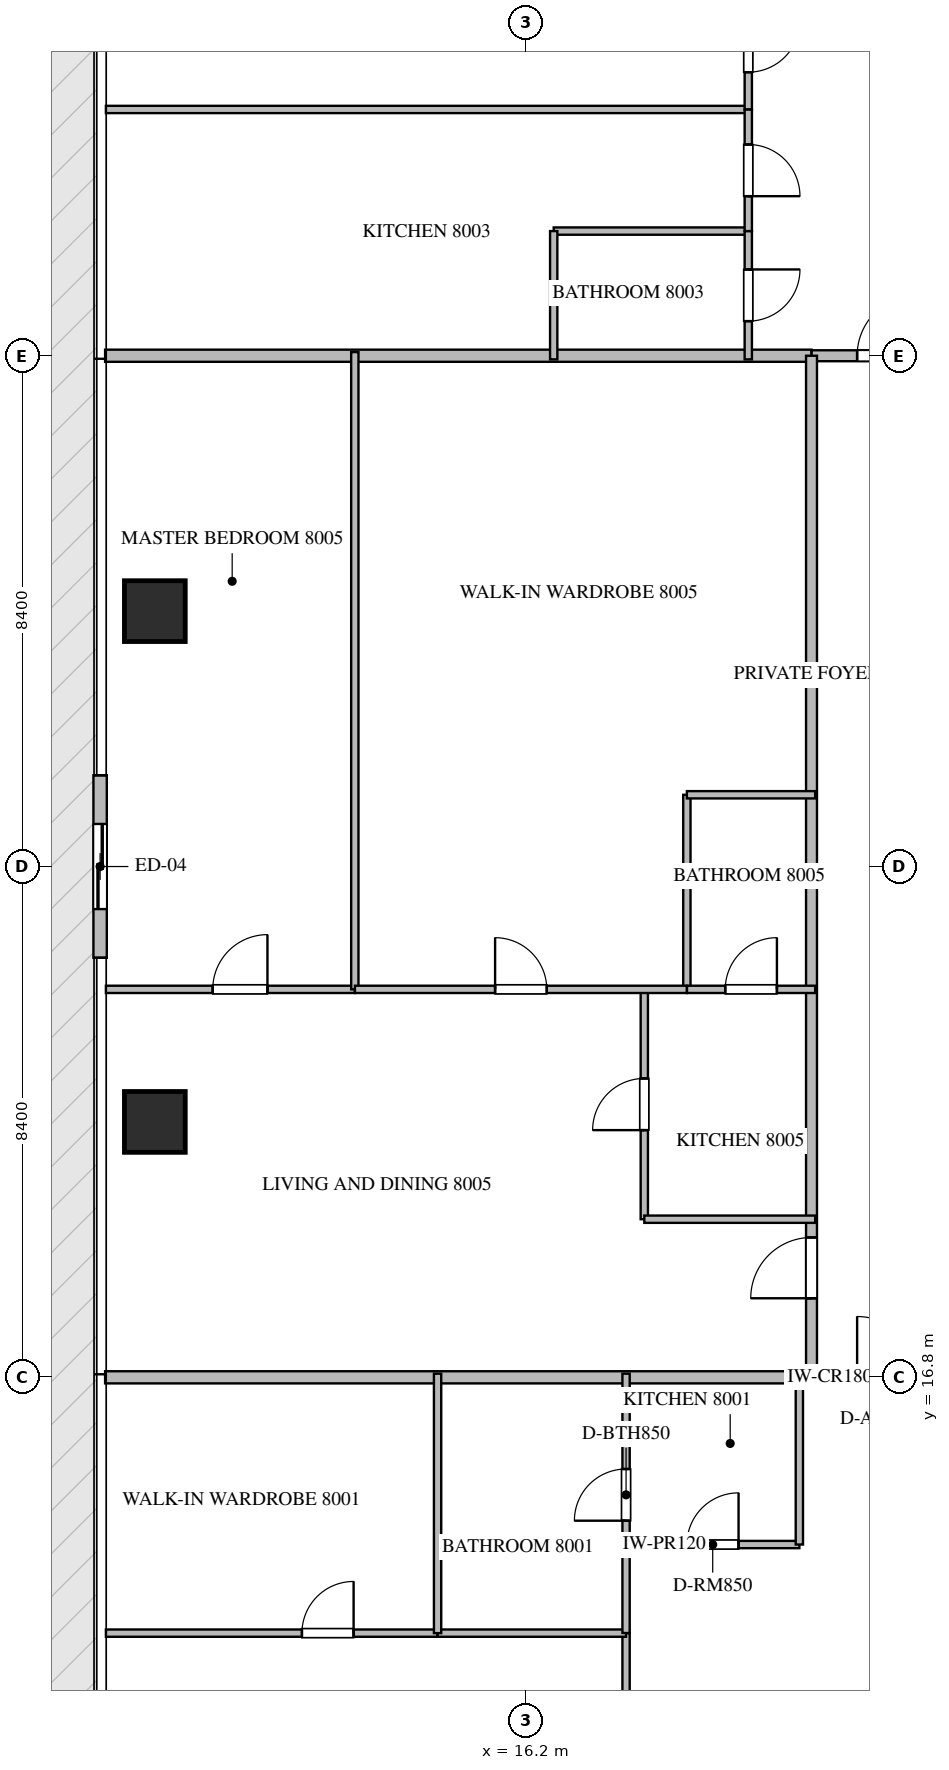
"""IFC4 building model, lengths in metres.
Left out: names, types, materials, properties, quantities, classifications, styles, units other than length and angle.
Written with IfcOpenShell. Run it as: python <this file> out.ifc"""

import sys

from ifc_helpers import new_model, si_unit, direction, frame, frame_2d, origin, origin_2d, place, context, subcontext, project, spatial, rectangle, extrude, source, transform, mapped, element, fill, save


model = new_model("IFC4")
c1 = context("Model", 3, precision=1e-05, world=origin(), true_north=direction((0.0, 1.0)))
c2 = subcontext(c1, "Body", "Model", "MODEL_VIEW")
j1 = project(units=[si_unit("LENGTHUNIT", "METRE"), si_unit("PLANEANGLEUNIT", "RADIAN")], contexts=[c1])
p1 = place(None, origin())
s1 = spatial("IfcSite", under=j1, at=p1, CompositionType="ELEMENT")
p2 = place(p1, origin())
s2 = spatial("IfcBuilding", under=s1, at=p2, CompositionType="ELEMENT")
p3 = place(p2, frame((0.0, 0.0, 321.8)))
s3 = spatial("IfcBuildingStorey", under=s2, at=p3, CompositionType="ELEMENT", Elevation=321.8)
m1 = source(origin(), c2, "Body", "SweptSolid", [
    extrude(rectangle(XDim=1.0, YDim=1.0, at=origin_2d()), origin(), (0.0, 0.0, 1.0), 4.05),
])
for number, where, z_axis, x_axis in (
    (1, (10.1, 21.0, -0.26), (0.0, 0.0, 1.0), (1.0, 0.0, 0.0)),
    (2, (10.1, 29.4, -0.26), (0.0, 0.0, 1.0), (1.0, 0.0, 0.0)),
):
    element("IfcColumn", number, at=place(p3, frame(where, z_axis=z_axis, x_axis=x_axis)), inside=s3, PredefinedType="COLUMN", context=c2, shape_type="MappedRepresentation", body=[
        mapped(m1, transform((0.0, 0.0, 0.0), scale=1.0)),
    ])
p4 = place(p3, frame((9.2, 26.7, 0.0), z_axis=(0.0, 0.0, 1.0), x_axis=(0.0, -1.0, 0.0)))
e3 = element("IfcWall", 3, at=p4, inside=s3, PredefinedType="ELEMENTEDWALL", context=c2, shape_type="SweptSolid", body=[
    extrude(rectangle(XDim=3.0, YDim=0.22, at=frame_2d((1.5, 0.0))), origin(), (0.0, 0.0, 1.0), 3.775),
])
p5 = place(p4, frame((0.8, 0.0, 0.0)))
e4 = element("IfcOpeningElement", 4, at=p5, cuts=e3, PredefinedType="OPENING", context=c2, shape_type="SweptSolid", body=[
    extrude(rectangle(XDim=1.4, YDim=2.25, at=frame_2d((0.7, 1.125))), frame((0.0, 0.12, 0.0), z_axis=(0.0, -1.0, 0.0), x_axis=(1.0, 0.0, 0.0)), (0.0, 0.0, 1.0), 0.24),
])
for number, where, z_axis, x_axis in (
    (5, (9.282, 16.8, 0.0), (0.0, 0.0, 1.0), (1.0, 0.0, 0.0)),
    (6, (9.282, 33.6, 0.0), (0.0, 0.0, 1.0), (1.0, 0.0, 0.0)),
):
    element("IfcWall", number, at=place(p3, frame(where, z_axis=z_axis, x_axis=x_axis)), inside=s3, PredefinedType="PARTITIONING", context=c2, shape_type="SweptSolid", body=[
        extrude(rectangle(XDim=11.618, YDim=0.2, at=frame_2d((5.809, 0.0))), origin(), (0.0, 0.0, 1.0), 3.79),
    ])
p6 = place(p3, frame((20.902, 16.8, 0.0), z_axis=(0.0, 0.0, 1.0), x_axis=(1.0, 0.0, 0.0)))
e7 = element("IfcWall", 7, at=p6, inside=s3, PredefinedType="PARTITIONING", context=c2, shape_type="SweptSolid", body=[
    extrude(rectangle(XDim=2.496, YDim=0.18, at=frame_2d((1.248, 0.0))), origin(), (0.0, 0.0, 1.0), 3.79),
])
p7 = place(p6, frame((0.748, 0.0, 0.0)))
e8 = element("IfcOpeningElement", 8, at=p7, cuts=e7, PredefinedType="OPENING", context=c2, shape_type="SweptSolid", body=[
    extrude(rectangle(XDim=1.0, YDim=2.15, at=frame_2d((0.5, 1.075))), frame((0.0, 0.1, 0.0), z_axis=(0.0, -1.0, 0.0), x_axis=(1.0, 0.0, 0.0)), (0.0, 0.0, 1.0), 0.2),
])
p8 = place(p3, frame((20.902, 33.6, 0.0), z_axis=(0.0, 0.0, 1.0), x_axis=(1.0, 0.0, 0.0)))
e9 = element("IfcWall", 9, at=p8, inside=s3, PredefinedType="PARTITIONING", context=c2, shape_type="SweptSolid", body=[
    extrude(rectangle(XDim=2.496, YDim=0.18, at=frame_2d((1.248, 0.0))), origin(), (0.0, 0.0, 1.0), 3.79),
])
p9 = place(p8, frame((0.748, 0.0, 0.0)))
e10 = element("IfcOpeningElement", 10, at=p9, cuts=e9, PredefinedType="OPENING", context=c2, shape_type="SweptSolid", body=[
    extrude(rectangle(XDim=1.0, YDim=2.15, at=frame_2d((0.5, 1.075))), frame((0.0, 0.1, 0.0), z_axis=(0.0, -1.0, 0.0), x_axis=(1.0, 0.0, 0.0)), (0.0, 0.0, 1.0), 0.2),
])
p10 = place(p3, frame((20.9, 16.8, 0.0), z_axis=(0.0, 0.0, 1.0), x_axis=(0.0, 1.0, 0.0)))
e11 = element("IfcWall", 11, at=p10, inside=s3, PredefinedType="PARTITIONING", context=c2, shape_type="SweptSolid", body=[
    extrude(rectangle(XDim=16.8, YDim=0.18, at=frame_2d((8.4, 0.0))), origin(), (0.0, 0.0, 1.0), 3.79),
])
p11 = place(p10, frame((1.3, 0.0, 0.0)))
e12 = element("IfcOpeningElement", 12, at=p11, cuts=e11, PredefinedType="OPENING", context=c2, shape_type="SweptSolid", body=[
    extrude(rectangle(XDim=1.0, YDim=2.15, at=frame_2d((0.5, 1.075))), frame((0.0, 0.1, 0.0), z_axis=(0.0, -1.0, 0.0), x_axis=(1.0, 0.0, 0.0)), (0.0, 0.0, 1.0), 0.2),
])
p12 = place(p3, frame((17.85, 14.05, 0.0), z_axis=(0.0, 0.0, 1.0), x_axis=(1.0, 0.0, 0.0)))
e13 = element("IfcWall", 13, at=p12, inside=s3, PredefinedType="PARTITIONING", context=c2, shape_type="SweptSolid", body=[
    extrude(rectangle(XDim=2.85, YDim=0.12, at=frame_2d((1.425, 0.0))), origin(), (0.0, 0.0, 1.0), 3.79),
])
p13 = place(p12, frame((1.0, 0.0, 0.0)))
e14 = element("IfcOpeningElement", 14, at=p13, cuts=e13, PredefinedType="OPENING", context=c2, shape_type="SweptSolid", body=[
    extrude(rectangle(XDim=0.85, YDim=2.1, at=frame_2d((0.425, 1.05))), frame((0.0, 0.07, 0.0), z_axis=(0.0, -1.0, 0.0), x_axis=(1.0, 0.0, 0.0)), (0.0, 0.0, 1.0), 0.14),
])
p14 = place(p3, frame((20.7, 14.05, 0.0), z_axis=(0.0, 0.0, 1.0), x_axis=(0.0, 1.0, 0.0)))
e15 = element("IfcWall", 15, at=p14, inside=s3, PredefinedType="PARTITIONING", context=c2, shape_type="SweptSolid", body=[
    extrude(rectangle(XDim=2.81, YDim=0.12, at=frame_2d((1.405, 0.0))), origin(), (0.0, 0.0, 1.0), 3.79),
])
p15 = place(p3, frame((17.85, 2.495, 0.0), z_axis=(0.0, 0.0, 1.0), x_axis=(0.0, 1.0, 0.0)))
e16 = element("IfcWall", 16, at=p15, inside=s3, PredefinedType="PARTITIONING", context=c2, shape_type="SweptSolid", body=[
    extrude(rectangle(XDim=10.098, YDim=0.12, at=frame_2d((5.049, 0.0))), origin(), (0.0, 0.0, 1.0), 3.292),
])
p16 = place(p15, frame((5.059, 0.0, 0.0)))
e17 = element("IfcOpeningElement", 17, at=p16, cuts=e16, PredefinedType="OPENING", context=c2, shape_type="SweptSolid", body=[
    extrude(rectangle(XDim=0.9, YDim=2.1, at=frame_2d((0.45, 1.05))), frame((0.0, 0.07, 0.0), z_axis=(0.0, -1.0, 0.0), x_axis=(1.0, 0.0, 0.0)), (0.0, 0.0, 1.0), 0.14),
])
p17 = place(p3, frame((9.295, 12.593, 0.0), z_axis=(0.0, 0.0, 1.0), x_axis=(1.0, 0.0, 0.0)))
e18 = element("IfcWall", 18, at=p17, inside=s3, PredefinedType="PARTITIONING", context=c2, shape_type="SweptSolid", body=[
    extrude(rectangle(XDim=5.455, YDim=0.12, at=frame_2d((2.728, 0.0))), origin(), (0.0, 0.0, 1.0), 3.79),
])
p18 = place(p17, frame((3.224, 0.0, 0.0)))
e19 = element("IfcOpeningElement", 19, at=p18, cuts=e18, PredefinedType="OPENING", context=c2, shape_type="SweptSolid", body=[
    extrude(rectangle(XDim=0.85, YDim=2.1, at=frame_2d((0.425, 1.05))), frame((0.0, 0.07, 0.0), z_axis=(0.0, -1.0, 0.0), x_axis=(1.0, 0.0, 0.0)), (0.0, 0.0, 1.0), 0.14),
])
p19 = place(p3, frame((14.752, 12.593, 0.0), z_axis=(0.0, 0.0, 1.0), x_axis=(1.0, 0.0, 0.0)))
e20 = element("IfcWall", 20, at=p19, inside=s3, PredefinedType="PARTITIONING", context=c2, shape_type="SweptSolid", body=[
    extrude(rectangle(XDim=3.098, YDim=0.12, at=frame_2d((1.549, 0.0))), origin(), (0.0, 0.0, 1.0), 3.79),
])
p20 = place(p3, frame((14.75, 12.593, 0.0), z_axis=(0.0, 0.0, 1.0), x_axis=(0.0, 1.0, 0.0)))
e21 = element("IfcWall", 21, at=p20, inside=s3, PredefinedType="PARTITIONING", context=c2, shape_type="SweptSolid", body=[
    extrude(rectangle(XDim=4.267, YDim=0.12, at=frame_2d((2.134, 0.0))), origin(), (0.0, 0.0, 1.0), 3.79),
])
p21 = place(p3, frame((17.85, 12.595, 0.0), z_axis=(0.0, 0.0, 1.0), x_axis=(0.0, 1.0, 0.0)))
e22 = element("IfcWall", 22, at=p21, inside=s3, PredefinedType="PARTITIONING", context=c2, shape_type="SweptSolid", body=[
    extrude(rectangle(XDim=4.265, YDim=0.12, at=frame_2d((2.133, 0.0))), origin(), (0.0, 0.0, 1.0), 3.372),
])
p22 = place(p21, frame((1.847, 0.0, 0.0)))
e23 = element("IfcOpeningElement", 23, at=p22, cuts=e22, PredefinedType="OPENING", context=c2, shape_type="SweptSolid", body=[
    extrude(rectangle(XDim=0.85, YDim=2.1, at=frame_2d((0.425, 1.05))), frame((0.0, 0.07, 0.0), z_axis=(0.0, -1.0, 0.0), x_axis=(1.0, 0.0, 0.0)), (0.0, 0.0, 1.0), 0.14),
])
p23 = place(p3, frame((9.295, 37.65, 0.0), z_axis=(0.0, 0.0, 1.0), x_axis=(1.0, 0.0, 0.0)))
e24 = element("IfcWall", 24, at=p23, inside=s3, PredefinedType="PARTITIONING", context=c2, shape_type="SweptSolid", body=[
    extrude(rectangle(XDim=10.565, YDim=0.12, at=frame_2d((5.283, 0.0))), origin(), (0.0, 0.0, 1.0), 3.79),
])
p24 = place(p3, frame((16.66, 35.65, 0.0), z_axis=(0.0, 0.0, 1.0), x_axis=(1.0, 0.0, 0.0)))
e25 = element("IfcWall", 25, at=p24, inside=s3, PredefinedType="PARTITIONING", context=c2, shape_type="SweptSolid", body=[
    extrude(rectangle(XDim=3.2, YDim=0.12, at=frame_2d((1.6, 0.0))), origin(), (0.0, 0.0, 1.0), 3.79),
])
p25 = place(p3, frame((16.66, 35.65, 0.0), z_axis=(0.0, 0.0, 1.0), x_axis=(0.0, -1.0, 0.0)))
e26 = element("IfcWall", 26, at=p25, inside=s3, PredefinedType="PARTITIONING", context=c2, shape_type="SweptSolid", body=[
    extrude(rectangle(XDim=2.11, YDim=0.12, at=frame_2d((1.055, 0.0))), origin(), (0.0, 0.0, 1.0), 3.79),
])
p26 = place(p3, frame((19.86, 39.726, 0.0), z_axis=(0.0, 0.0, 1.0), x_axis=(0.0, -1.0, 0.0)))
e27 = element("IfcWall", 27, at=p26, inside=s3, PredefinedType="PARTITIONING", context=c2, shape_type="SweptSolid", body=[
    extrude(rectangle(XDim=2.076, YDim=0.12, at=frame_2d((1.038, 0.0))), origin(), (0.0, 0.0, 1.0), 3.79),
])
p27 = place(p26, frame((0.613, 0.0, 0.0)))
e28 = element("IfcOpeningElement", 28, at=p27, cuts=e27, PredefinedType="OPENING", context=c2, shape_type="SweptSolid", body=[
    extrude(rectangle(XDim=0.85, YDim=2.1, at=frame_2d((0.425, 1.05))), frame((0.0, 0.07, 0.0), z_axis=(0.0, -1.0, 0.0), x_axis=(1.0, 0.0, 0.0)), (0.0, 0.0, 1.0), 0.14),
])
p28 = place(p3, frame((19.86, 37.648, 0.0), z_axis=(0.0, 0.0, 1.0), x_axis=(0.0, -1.0, 0.0)))
e29 = element("IfcWall", 29, at=p28, inside=s3, PredefinedType="PARTITIONING", context=c2, shape_type="SweptSolid", body=[
    extrude(rectangle(XDim=1.998, YDim=0.12, at=frame_2d((0.999, 0.0))), origin(), (0.0, 0.0, 1.0), 3.79),
])
p29 = place(p28, frame((0.574, 0.0, 0.0)))
e30 = element("IfcOpeningElement", 30, at=p29, cuts=e29, PredefinedType="OPENING", context=c2, shape_type="SweptSolid", body=[
    extrude(rectangle(XDim=0.85, YDim=2.1, at=frame_2d((0.425, 1.05))), frame((0.0, 0.07, 0.0), z_axis=(0.0, -1.0, 0.0), x_axis=(1.0, 0.0, 0.0)), (0.0, 0.0, 1.0), 0.14),
])
p30 = place(p3, frame((19.86, 35.648, 0.0), z_axis=(0.0, 0.0, 1.0), x_axis=(0.0, -1.0, 0.0)))
e31 = element("IfcWall", 31, at=p30, inside=s3, PredefinedType="PARTITIONING", context=c2, shape_type="SweptSolid", body=[
    extrude(rectangle(XDim=2.108, YDim=0.12, at=frame_2d((1.054, 0.0))), origin(), (0.0, 0.0, 1.0), 3.79),
])
p31 = place(p30, frame((0.629, 0.0, 0.0)))
e32 = element("IfcOpeningElement", 32, at=p31, cuts=e31, PredefinedType="OPENING", context=c2, shape_type="SweptSolid", body=[
    extrude(rectangle(XDim=0.85, YDim=2.1, at=frame_2d((0.425, 1.05))), frame((0.0, 0.07, 0.0), z_axis=(0.0, -1.0, 0.0), x_axis=(1.0, 0.0, 0.0)), (0.0, 0.0, 1.0), 0.14),
])
p32 = place(p3, frame((18.15, 19.4, 0.0), z_axis=(0.0, 0.0, 1.0), x_axis=(0.0, 1.0, 0.0)))
e33 = element("IfcWall", 33, at=p32, inside=s3, PredefinedType="PARTITIONING", context=c2, shape_type="SweptSolid", body=[
    extrude(rectangle(XDim=3.78, YDim=0.12, at=frame_2d((1.89, 0.0))), origin(), (0.0, 0.0, 1.0), 3.79),
])
p33 = place(p32, frame((1.465, 0.0, 0.0)))
e34 = element("IfcOpeningElement", 34, at=p33, cuts=e33, PredefinedType="OPENING", context=c2, shape_type="SweptSolid", body=[
    extrude(rectangle(XDim=0.85, YDim=2.1, at=frame_2d((0.425, 1.05))), frame((0.0, 0.07, 0.0), z_axis=(0.0, -1.0, 0.0), x_axis=(1.0, 0.0, 0.0)), (0.0, 0.0, 1.0), 0.14),
])
p34 = place(p3, frame((18.15, 19.4, 0.0), z_axis=(0.0, 0.0, 1.0), x_axis=(1.0, 0.0, 0.0)))
e35 = element("IfcWall", 35, at=p34, inside=s3, PredefinedType="PARTITIONING", context=c2, shape_type="SweptSolid", body=[
    extrude(rectangle(XDim=2.81, YDim=0.12, at=frame_2d((1.405, 0.0))), origin(), (0.0, 0.0, 1.0), 3.79),
])
p35 = place(p3, frame((9.295, 23.18, 0.0), z_axis=(0.0, 0.0, 1.0), x_axis=(1.0, 0.0, 0.0)))
e36 = element("IfcWall", 36, at=p35, inside=s3, PredefinedType="PARTITIONING", context=c2, shape_type="SweptSolid", body=[
    extrude(rectangle(XDim=4.094, YDim=0.12, at=frame_2d((2.047, 0.0))), origin(), (0.0, 0.0, 1.0), 3.79),
])
p36 = place(p35, frame((1.757, 0.0, 0.0)))
e37 = element("IfcOpeningElement", 37, at=p36, cuts=e36, PredefinedType="OPENING", context=c2, shape_type="SweptSolid", body=[
    extrude(rectangle(XDim=0.9, YDim=2.1, at=frame_2d((0.45, 1.05))), frame((0.0, 0.07, 0.0), z_axis=(0.0, -1.0, 0.0), x_axis=(1.0, 0.0, 0.0)), (0.0, 0.0, 1.0), 0.14),
])
p37 = place(p3, frame((13.389, 23.18, 0.0), z_axis=(0.0, 0.0, 1.0), x_axis=(0.0, 1.0, 0.0)))
e38 = element("IfcWall", 38, at=p37, inside=s3, PredefinedType="PARTITIONING", context=c2, shape_type="SweptSolid", body=[
    extrude(rectangle(XDim=10.48, YDim=0.12, at=frame_2d((5.24, 0.0))), origin(), (0.0, 0.0, 1.0), 3.79),
])
p38 = place(p3, frame((18.85, 23.18, 0.0), z_axis=(0.0, 0.0, 1.0), x_axis=(0.0, 1.0, 0.0)))
e39 = element("IfcWall", 39, at=p38, inside=s3, PredefinedType="PARTITIONING", context=c2, shape_type="SweptSolid", body=[
    extrude(rectangle(XDim=3.2, YDim=0.12, at=frame_2d((1.6, 0.0))), origin(), (0.0, 0.0, 1.0), 3.79),
])
p39 = place(p3, frame((18.85, 26.38, 0.0), z_axis=(0.0, 0.0, 1.0), x_axis=(1.0, 0.0, 0.0)))
e40 = element("IfcWall", 40, at=p39, inside=s3, PredefinedType="PARTITIONING", context=c2, shape_type="SweptSolid", body=[
    extrude(rectangle(XDim=2.11, YDim=0.12, at=frame_2d((1.055, 0.0))), origin(), (0.0, 0.0, 1.0), 3.79),
])
p40 = place(p3, frame((13.391, 23.18, 0.0), z_axis=(0.0, 0.0, 1.0), x_axis=(1.0, 0.0, 0.0)))
e41 = element("IfcWall", 41, at=p40, inside=s3, PredefinedType="PARTITIONING", context=c2, shape_type="SweptSolid", body=[
    extrude(rectangle(XDim=5.459, YDim=0.12, at=frame_2d((2.729, 0.0))), origin(), (0.0, 0.0, 1.0), 3.79),
])
p41 = place(p40, frame((2.305, 0.0, 0.0)))
e42 = element("IfcOpeningElement", 42, at=p41, cuts=e41, PredefinedType="OPENING", context=c2, shape_type="SweptSolid", body=[
    extrude(rectangle(XDim=0.85, YDim=2.1, at=frame_2d((0.425, 1.05))), frame((0.0, 0.07, 0.0), z_axis=(0.0, -1.0, 0.0), x_axis=(1.0, 0.0, 0.0)), (0.0, 0.0, 1.0), 0.14),
])
p42 = place(p3, frame((18.852, 23.18, 0.0), z_axis=(0.0, 0.0, 1.0), x_axis=(1.0, 0.0, 0.0)))
e43 = element("IfcWall", 43, at=p42, inside=s3, PredefinedType="PARTITIONING", context=c2, shape_type="SweptSolid", body=[
    extrude(rectangle(XDim=2.108, YDim=0.12, at=frame_2d((1.054, 0.0))), origin(), (0.0, 0.0, 1.0), 3.79),
])
p43 = place(p42, frame((0.629, 0.0, 0.0)))
e44 = element("IfcOpeningElement", 44, at=p43, cuts=e43, PredefinedType="OPENING", context=c2, shape_type="SweptSolid", body=[
    extrude(rectangle(XDim=0.85, YDim=2.1, at=frame_2d((0.425, 1.05))), frame((0.0, 0.07, 0.0), z_axis=(0.0, -1.0, 0.0), x_axis=(1.0, 0.0, 0.0)), (0.0, 0.0, 1.0), 0.14),
])
m2 = source(origin(), c2, "Body", "SweptSolid", [
    extrude(rectangle(XDim=1.4, YDim=2.25, at=frame_2d((0.7, 1.125))), frame((0.0, 0.025, 0.0), z_axis=(0.0, -1.0, 0.0), x_axis=(1.0, 0.0, 0.0)), (0.0, 0.0, 1.0), 0.05),
])
p44 = place(p5, origin())
e45 = element("IfcDoor", 45, at=p44, inside=s3, OperationType="SLIDING_TO_LEFT", PredefinedType="DOOR", context=c2, shape_type="MappedRepresentation", body=[
    mapped(m2, transform((0.0, 0.0, 0.0), scale=1.0)),
])
fill(e4, e45)
m3 = source(origin(), c2, "Body", "SweptSolid", [
    extrude(rectangle(XDim=1.0, YDim=2.15, at=frame_2d((0.5, 1.075))), frame((0.0, 0.025, 0.0), z_axis=(0.0, -1.0, 0.0), x_axis=(1.0, 0.0, 0.0)), (0.0, 0.0, 1.0), 0.05),
])
p45 = place(p7, origin())
e46 = element("IfcDoor", 46, at=p45, inside=s3, OperationType="SINGLE_SWING_LEFT", PredefinedType="DOOR", context=c2, shape_type="MappedRepresentation", body=[
    mapped(m3, transform((0.0, 0.0, 0.0), scale=1.0)),
])
fill(e8, e46)
p46 = place(p9, origin())
e47 = element("IfcDoor", 47, at=p46, inside=s3, OperationType="SINGLE_SWING_RIGHT", PredefinedType="DOOR", context=c2, shape_type="MappedRepresentation", body=[
    mapped(m3, transform((0.0, 0.0, 0.0), scale=1.0)),
])
fill(e10, e47)
p47 = place(p11, origin())
e48 = element("IfcDoor", 48, at=p47, inside=s3, OperationType="SINGLE_SWING_LEFT", PredefinedType="DOOR", context=c2, shape_type="MappedRepresentation", body=[
    mapped(m3, transform((0.0, 0.0, 0.0), scale=1.0)),
])
fill(e12, e48)
m4 = source(origin(), c2, "Body", "SweptSolid", [
    extrude(rectangle(XDim=0.85, YDim=2.1, at=frame_2d((0.425, 1.05))), frame((0.0, 0.025, 0.0), z_axis=(0.0, -1.0, 0.0), x_axis=(1.0, 0.0, 0.0)), (0.0, 0.0, 1.0), 0.05),
])
p48 = place(p13, origin())
e49 = element("IfcDoor", 49, at=p48, inside=s3, OperationType="SINGLE_SWING_RIGHT", PredefinedType="DOOR", context=c2, shape_type="MappedRepresentation", body=[
    mapped(m4, transform((0.0, 0.0, 0.0), scale=1.0)),
])
fill(e14, e49)
p49 = place(p18, origin())
e50 = element("IfcDoor", 50, at=p49, inside=s3, OperationType="SINGLE_SWING_RIGHT", PredefinedType="DOOR", context=c2, shape_type="MappedRepresentation", body=[
    mapped(m4, transform((0.0, 0.0, 0.0), scale=1.0)),
])
fill(e19, e50)
p50 = place(p22, origin())
e51 = element("IfcDoor", 51, at=p50, inside=s3, OperationType="SINGLE_SWING_LEFT", PredefinedType="DOOR", context=c2, shape_type="MappedRepresentation", body=[
    mapped(m4, transform((0.0, 0.0, 0.0), scale=1.0)),
])
fill(e23, e51)
p51 = place(p27, origin())
e52 = element("IfcDoor", 52, at=p51, inside=s3, OperationType="SINGLE_SWING_LEFT", PredefinedType="DOOR", context=c2, shape_type="MappedRepresentation", body=[
    mapped(m4, transform((0.0, 0.0, 0.0), scale=1.0)),
])
fill(e28, e52)
p52 = place(p29, origin())
e53 = element("IfcDoor", 53, at=p52, inside=s3, OperationType="SINGLE_SWING_RIGHT", PredefinedType="DOOR", context=c2, shape_type="MappedRepresentation", body=[
    mapped(m4, transform((0.0, 0.0, 0.0), scale=1.0)),
])
fill(e30, e53)
p53 = place(p31, origin())
e54 = element("IfcDoor", 54, at=p53, inside=s3, OperationType="SINGLE_SWING_LEFT", PredefinedType="DOOR", context=c2, shape_type="MappedRepresentation", body=[
    mapped(m4, transform((0.0, 0.0, 0.0), scale=1.0)),
])
fill(e32, e54)
p54 = place(p33, origin())
e55 = element("IfcDoor", 55, at=p54, inside=s3, OperationType="SINGLE_SWING_LEFT", PredefinedType="DOOR", context=c2, shape_type="MappedRepresentation", body=[
    mapped(m4, transform((0.0, 0.0, 0.0), scale=1.0)),
])
fill(e34, e55)
m5 = source(origin(), c2, "Body", "SweptSolid", [
    extrude(rectangle(XDim=0.9, YDim=2.1, at=frame_2d((0.45, 1.05))), frame((0.0, 0.025, 0.0), z_axis=(0.0, -1.0, 0.0), x_axis=(1.0, 0.0, 0.0)), (0.0, 0.0, 1.0), 0.05),
])
p55 = place(p36, origin())
e56 = element("IfcDoor", 56, at=p55, inside=s3, OperationType="SINGLE_SWING_RIGHT", PredefinedType="DOOR", context=c2, shape_type="MappedRepresentation", body=[
    mapped(m5, transform((0.0, 0.0, 0.0), scale=1.0)),
])
fill(e37, e56)
p56 = place(p41, origin())
e57 = element("IfcDoor", 57, at=p56, inside=s3, OperationType="SINGLE_SWING_LEFT", PredefinedType="DOOR", context=c2, shape_type="MappedRepresentation", body=[
    mapped(m4, transform((0.0, 0.0, 0.0), scale=1.0)),
])
fill(e42, e57)
p57 = place(p43, origin())
e58 = element("IfcDoor", 58, at=p57, inside=s3, OperationType="SINGLE_SWING_RIGHT", PredefinedType="DOOR", context=c2, shape_type="MappedRepresentation", body=[
    mapped(m4, transform((0.0, 0.0, 0.0), scale=1.0)),
])
fill(e44, e58)
save(model, sys.argv[1])
